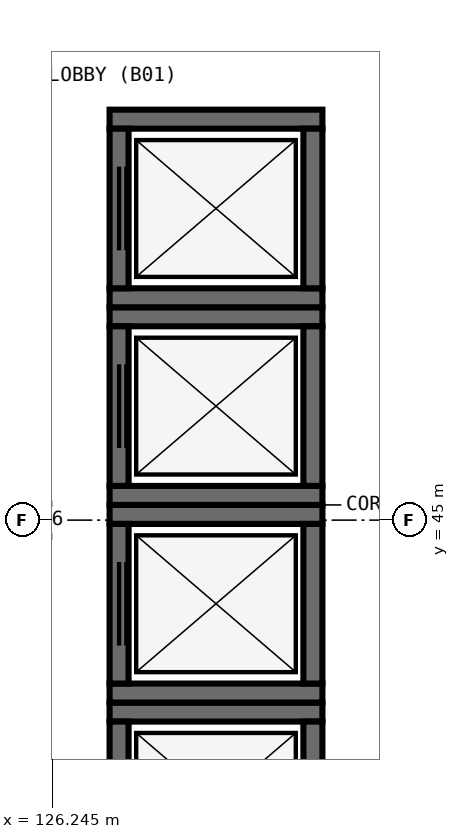
"""IFC4 building model, lengths in metres.
Left out: names, types, materials, properties, quantities, classifications, styles, units other than length and angle.
Written with IfcOpenShell. Run it as: python <this file> out.ifc"""

import sys

from ifc_helpers import new_model, si_unit, direction, frame, frame_2d, origin, place, context, subcontext, project, spatial, rectangle, extrude, element, fill, save


model = new_model("IFC4")
c1 = context("Model", 3, precision=1e-05, world=origin(), true_north=direction((0.0, 1.0)))
c2 = subcontext(c1, "Body", "Model", "MODEL_VIEW")
j1 = project(units=[si_unit("LENGTHUNIT", "METRE"), si_unit("PLANEANGLEUNIT", "RADIAN")], contexts=[c1])
p1 = place(None, origin())
s1 = spatial("IfcSite", under=j1, at=p1, CompositionType="ELEMENT")
p2 = place(p1, origin())
s2 = spatial("IfcBuilding", under=s1, at=p2, CompositionType="ELEMENT")
p3 = place(p2, frame((0.0, 0.0, -5.4)))
s3 = spatial("IfcBuildingStorey", under=s2, at=p3, CompositionType="ELEMENT", Elevation=-5.4)
p4 = place(p3, frame((129.8, 42.475, 0.0), z_axis=(0.0, 0.0, 1.0), x_axis=(-1.0, 0.0, 0.0)))
e1 = element("IfcWall", 1, at=p4, inside=s3, PredefinedType="SHEAR", context=c2, shape_type="SweptSolid", body=[
    extrude(rectangle(XDim=2.8, YDim=0.25, at=frame_2d((1.4, 0.0))), origin(), (0.0, 0.0, 1.0), 5.4),
])
p5 = place(p3, frame((127.125, 42.35, 0.0), z_axis=(0.0, 0.0, 1.0), x_axis=(0.0, -1.0, 0.0)))
e2 = element("IfcWall", 2, at=p5, inside=s3, PredefinedType="SHEAR", context=c2, shape_type="SweptSolid", body=[
    extrude(rectangle(XDim=2.1, YDim=0.25, at=frame_2d((1.05, 0.0))), origin(), (0.0, 0.0, 1.0), 5.4),
])
p6 = place(p5, frame((0.5, 0.0, 0.0)))
e3 = element("IfcOpeningElement", 3, at=p6, cuts=e2, PredefinedType="OPENING", context=c2, shape_type="SweptSolid", body=[
    extrude(rectangle(XDim=1.1, YDim=2.2, at=frame_2d((0.55, 1.1))), frame((0.0, 0.14, 0.0), z_axis=(0.0, -1.0, 0.0), x_axis=(1.0, 0.0, 0.0)), (0.0, 0.0, 1.0), 0.28),
])
p7 = place(p3, frame((129.675, 40.25, 0.0), z_axis=(0.0, 0.0, 1.0), x_axis=(0.0, 1.0, 0.0)))
e4 = element("IfcWall", 4, at=p7, inside=s3, PredefinedType="SHEAR", context=c2, shape_type="SweptSolid", body=[
    extrude(rectangle(XDim=2.1, YDim=0.25, at=frame_2d((1.05, 0.0))), origin(), (0.0, 0.0, 1.0), 5.4),
])
for number, where, z_axis, x_axis in (
    (5, (127.0, 42.725, 0.0), (0.0, 0.0, 1.0), (1.0, 0.0, 0.0)),
    (6, (129.8, 45.075, 0.0), (0.0, 0.0, 1.0), (-1.0, 0.0, 0.0)),
):
    element("IfcWall", number, at=place(p3, frame(where, z_axis=z_axis, x_axis=x_axis)), inside=s3, PredefinedType="SHEAR", context=c2, shape_type="SweptSolid", body=[
        extrude(rectangle(XDim=2.8, YDim=0.25, at=frame_2d((1.4, 0.0))), origin(), (0.0, 0.0, 1.0), 5.4),
    ])
p8 = place(p3, frame((127.125, 44.95, 0.0), z_axis=(0.0, 0.0, 1.0), x_axis=(0.0, -1.0, 0.0)))
e7 = element("IfcWall", 7, at=p8, inside=s3, PredefinedType="SHEAR", context=c2, shape_type="SweptSolid", body=[
    extrude(rectangle(XDim=2.1, YDim=0.25, at=frame_2d((1.05, 0.0))), origin(), (0.0, 0.0, 1.0), 5.4),
])
p9 = place(p8, frame((0.5, 0.0, 0.0)))
e8 = element("IfcOpeningElement", 8, at=p9, cuts=e7, PredefinedType="OPENING", context=c2, shape_type="SweptSolid", body=[
    extrude(rectangle(XDim=1.1, YDim=2.2, at=frame_2d((0.55, 1.1))), frame((0.0, 0.14, 0.0), z_axis=(0.0, -1.0, 0.0), x_axis=(1.0, 0.0, 0.0)), (0.0, 0.0, 1.0), 0.28),
])
p10 = place(p3, frame((129.675, 42.85, 0.0), z_axis=(0.0, 0.0, 1.0), x_axis=(0.0, 1.0, 0.0)))
e9 = element("IfcWall", 9, at=p10, inside=s3, PredefinedType="SHEAR", context=c2, shape_type="SweptSolid", body=[
    extrude(rectangle(XDim=2.1, YDim=0.25, at=frame_2d((1.05, 0.0))), origin(), (0.0, 0.0, 1.0), 5.4),
])
for number, where, z_axis, x_axis in (
    (10, (127.0, 45.325, 0.0), (0.0, 0.0, 1.0), (1.0, 0.0, 0.0)),
    (11, (129.8, 47.675, 0.0), (0.0, 0.0, 1.0), (-1.0, 0.0, 0.0)),
):
    element("IfcWall", number, at=place(p3, frame(where, z_axis=z_axis, x_axis=x_axis)), inside=s3, PredefinedType="SHEAR", context=c2, shape_type="SweptSolid", body=[
        extrude(rectangle(XDim=2.8, YDim=0.25, at=frame_2d((1.4, 0.0))), origin(), (0.0, 0.0, 1.0), 5.4),
    ])
p11 = place(p3, frame((127.125, 47.55, 0.0), z_axis=(0.0, 0.0, 1.0), x_axis=(0.0, -1.0, 0.0)))
e12 = element("IfcWall", 12, at=p11, inside=s3, PredefinedType="SHEAR", context=c2, shape_type="SweptSolid", body=[
    extrude(rectangle(XDim=2.1, YDim=0.25, at=frame_2d((1.05, 0.0))), origin(), (0.0, 0.0, 1.0), 5.4),
])
p12 = place(p11, frame((0.5, 0.0, 0.0)))
e13 = element("IfcOpeningElement", 13, at=p12, cuts=e12, PredefinedType="OPENING", context=c2, shape_type="SweptSolid", body=[
    extrude(rectangle(XDim=1.1, YDim=2.2, at=frame_2d((0.55, 1.1))), frame((0.0, 0.14, 0.0), z_axis=(0.0, -1.0, 0.0), x_axis=(1.0, 0.0, 0.0)), (0.0, 0.0, 1.0), 0.28),
])
p13 = place(p3, frame((129.675, 45.45, 0.0), z_axis=(0.0, 0.0, 1.0), x_axis=(0.0, 1.0, 0.0)))
e14 = element("IfcWall", 14, at=p13, inside=s3, PredefinedType="SHEAR", context=c2, shape_type="SweptSolid", body=[
    extrude(rectangle(XDim=2.1, YDim=0.25, at=frame_2d((1.05, 0.0))), origin(), (0.0, 0.0, 1.0), 5.4),
])
for number, where, z_axis, x_axis in (
    (15, (127.0, 47.925, 0.0), (0.0, 0.0, 1.0), (1.0, 0.0, 0.0)),
    (16, (129.8, 50.275, 0.0), (0.0, 0.0, 1.0), (-1.0, 0.0, 0.0)),
):
    element("IfcWall", number, at=place(p3, frame(where, z_axis=z_axis, x_axis=x_axis)), inside=s3, PredefinedType="SHEAR", context=c2, shape_type="SweptSolid", body=[
        extrude(rectangle(XDim=2.8, YDim=0.25, at=frame_2d((1.4, 0.0))), origin(), (0.0, 0.0, 1.0), 5.4),
    ])
p14 = place(p3, frame((127.125, 50.15, 0.0), z_axis=(0.0, 0.0, 1.0), x_axis=(0.0, -1.0, 0.0)))
e17 = element("IfcWall", 17, at=p14, inside=s3, PredefinedType="SHEAR", context=c2, shape_type="SweptSolid", body=[
    extrude(rectangle(XDim=2.1, YDim=0.25, at=frame_2d((1.05, 0.0))), origin(), (0.0, 0.0, 1.0), 5.4),
])
p15 = place(p14, frame((0.5, 0.0, 0.0)))
e18 = element("IfcOpeningElement", 18, at=p15, cuts=e17, PredefinedType="OPENING", context=c2, shape_type="SweptSolid", body=[
    extrude(rectangle(XDim=1.1, YDim=2.2, at=frame_2d((0.55, 1.1))), frame((0.0, 0.14, 0.0), z_axis=(0.0, -1.0, 0.0), x_axis=(1.0, 0.0, 0.0)), (0.0, 0.0, 1.0), 0.28),
])
p16 = place(p3, frame((129.675, 48.05, 0.0), z_axis=(0.0, 0.0, 1.0), x_axis=(0.0, 1.0, 0.0)))
e19 = element("IfcWall", 19, at=p16, inside=s3, PredefinedType="SHEAR", context=c2, shape_type="SweptSolid", body=[
    extrude(rectangle(XDim=2.1, YDim=0.25, at=frame_2d((1.05, 0.0))), origin(), (0.0, 0.0, 1.0), 5.4),
])
p17 = place(p9, origin())
e20 = element("IfcDoor", 20, at=p17, inside=s3, OperationType="DOUBLE_DOOR_SLIDING", PredefinedType="DOOR", context=c2, shape_type="SweptSolid", body=[
    extrude(rectangle(XDim=1.1, YDim=2.2, at=frame_2d((0.55, 1.1))), frame((0.0, 0.025, 0.0), z_axis=(0.0, -1.0, 0.0), x_axis=(1.0, 0.0, 0.0)), (0.0, 0.0, 1.0), 0.05),
])
fill(e8, e20)
p18 = place(p12, origin())
e21 = element("IfcDoor", 21, at=p18, inside=s3, OperationType="DOUBLE_DOOR_SLIDING", PredefinedType="DOOR", context=c2, shape_type="SweptSolid", body=[
    extrude(rectangle(XDim=1.1, YDim=2.2, at=frame_2d((0.55, 1.1))), frame((0.0, 0.025, 0.0), z_axis=(0.0, -1.0, 0.0), x_axis=(1.0, 0.0, 0.0)), (0.0, 0.0, 1.0), 0.05),
])
fill(e13, e21)
p19 = place(p15, origin())
e22 = element("IfcDoor", 22, at=p19, inside=s3, OperationType="DOUBLE_DOOR_SLIDING", PredefinedType="DOOR", context=c2, shape_type="SweptSolid", body=[
    extrude(rectangle(XDim=1.1, YDim=2.2, at=frame_2d((0.55, 1.1))), frame((0.0, 0.025, 0.0), z_axis=(0.0, -1.0, 0.0), x_axis=(1.0, 0.0, 0.0)), (0.0, 0.0, 1.0), 0.05),
])
fill(e18, e22)
save(model, sys.argv[1])
